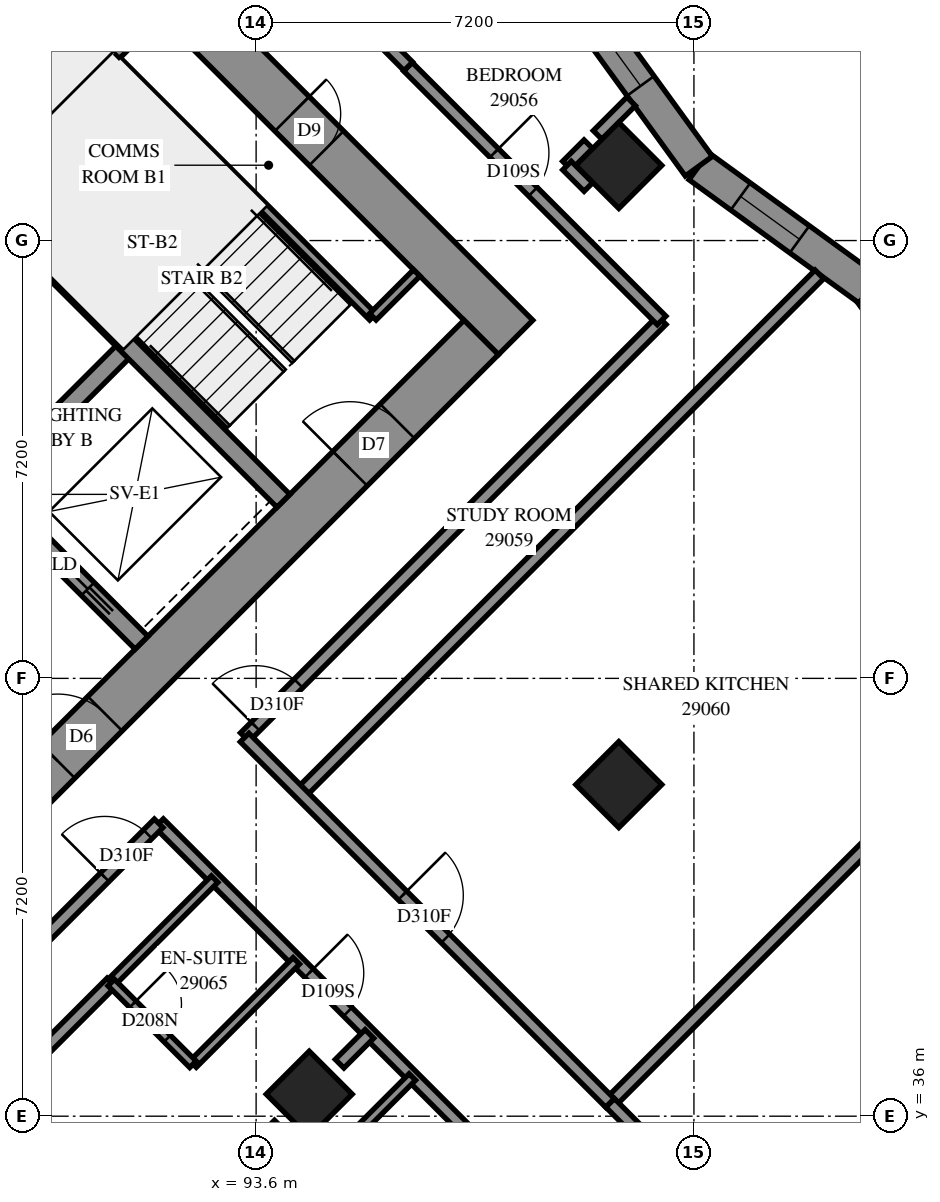
"""IFC4 building model, lengths in metres.
Left out: names, types, materials, properties, quantities, classifications, styles, units other than length and angle.
Written with IfcOpenShell. Run it as: python <this file> out.ifc"""

import sys

from ifc_helpers import new_model, si_unit, direction, frame, frame_2d, origin, origin_2d, place, context, subcontext, project, spatial, polyline, rectangle, outline, extrude, element, fill, save


model = new_model("IFC4")
c1 = context("Model", 3, precision=1e-05, world=origin(), true_north=direction((0.0, 1.0)))
c2 = subcontext(c1, "Body", "Model", "MODEL_VIEW")
j1 = project(units=[si_unit("LENGTHUNIT", "METRE"), si_unit("PLANEANGLEUNIT", "RADIAN")], contexts=[c1])
p1 = place(None, origin())
s1 = spatial("IfcSite", under=j1, at=p1, CompositionType="ELEMENT")
p2 = place(p1, origin())
s2 = spatial("IfcBuilding", under=s1, at=p2, CompositionType="ELEMENT")
p3 = place(p2, frame((0.0, 0.0, 108.4)))
s3 = spatial("IfcBuildingStorey", under=s2, at=p3, CompositionType="ELEMENT", Elevation=108.4)
for number, where, z_axis, x_axis in (
    (1, (99.565, 51.635, 0.0), (0.0, 0.0, 1.0), (0.707, -0.707, 0.0)),
    (2, (99.565, 41.453, 0.0), (0.0, 0.0, 1.0), (0.707, -0.707, 0.0)),
    (3, (94.474, 36.362, 0.0), (0.0, 0.0, 1.0), (0.707, -0.707, 0.0)),
):
    element("IfcColumn", number, at=place(p3, frame(where, z_axis=z_axis, x_axis=x_axis)), inside=s3, PredefinedType="COLUMN", context=c2, shape_type="SweptSolid", body=[
        extrude(rectangle(XDim=1.0, YDim=1.0, at=origin_2d()), origin(), (0.0, 0.0, 1.0), 3.1),
    ])
p4 = place(p3, frame((86.554, 60.121, -0.3), z_axis=(0.0, 0.0, 1.0), x_axis=(0.7071067812, -0.7071067812, 0.0)))
e4 = element("IfcWall", 4, at=p4, inside=s3, PredefinedType="SHEAR", context=c2, shape_type="SweptSolid", body=[
    extrude(rectangle(XDim=16.0, YDim=0.8, at=frame_2d((8.0, 0.0))), origin(), (0.0, 0.0, 1.0), 2.7),
])
p5 = place(p4, frame((10.8, 0.0, 0.3)))
e5 = element("IfcOpeningElement", 5, at=p5, cuts=e4, PredefinedType="OPENING", context=c2, shape_type="SweptSolid", body=[
    extrude(rectangle(XDim=0.8, YDim=2.1, at=frame_2d((0.4, 1.05))), frame((0.0, 0.41, 0.0), z_axis=(0.0, -1.0, 0.0), x_axis=(1.0, 0.0, 0.0)), (0.0, 0.0, 1.0), 0.82),
])
p6 = place(p3, frame((87.12, 38.625, -0.3), z_axis=(0.0, 0.0, 1.0), x_axis=(0.7071067812, 0.7071067812, 0.0)))
e6 = element("IfcWall", 6, at=p6, inside=s3, PredefinedType="SHEAR", context=c2, shape_type="SweptSolid", body=[
    extrude(rectangle(XDim=14.4, YDim=0.8, at=frame_2d((7.2, 0.0))), origin(), (0.0, 0.0, 1.0), 2.7),
])
p7 = place(p6, frame((4.55, 0.0, 0.3)))
e7 = element("IfcOpeningElement", 7, at=p7, cuts=e6, PredefinedType="OPENING", context=c2, shape_type="SweptSolid", body=[
    extrude(rectangle(XDim=1.1, YDim=2.1, at=frame_2d((0.55, 1.05))), frame((0.0, 0.41, 0.0), z_axis=(0.0, -1.0, 0.0), x_axis=(1.0, 0.0, 0.0)), (0.0, 0.0, 1.0), 0.82),
])
p8 = place(p6, frame((11.35, 0.0, 0.3)))
e8 = element("IfcOpeningElement", 8, at=p8, cuts=e6, PredefinedType="OPENING", context=c2, shape_type="SweptSolid", body=[
    extrude(rectangle(XDim=1.1, YDim=2.1, at=frame_2d((0.55, 1.05))), frame((0.0, 0.41, 0.0), z_axis=(0.0, -1.0, 0.0), x_axis=(1.0, 0.0, 0.0)), (0.0, 0.0, 1.0), 0.82),
])
p9 = place(p3, frame((89.17, 46.332, 0.0), z_axis=(0.0, 0.0, 1.0), x_axis=(0.7071067812, 0.7071067812, 0.0)))
e9 = element("IfcWall", 9, at=p9, inside=s3, PredefinedType="SOLIDWALL", context=c2, shape_type="SweptSolid", body=[
    extrude(rectangle(XDim=3.3, YDim=0.3, at=frame_2d((1.65, 0.0))), origin(), (0.0, 0.0, 1.0), 3.1),
])
p10 = place(p3, frame((81.534, 53.969, 0.0), z_axis=(0.0, 0.0, 1.0), x_axis=(0.707103309, -0.7071102534, 0.0)))
e10 = element("IfcWall", 10, at=p10, inside=s3, PredefinedType="SOLIDWALL", context=c2, shape_type="SweptSolid", body=[
    extrude(rectangle(XDim=14.4, YDim=0.3, at=frame_2d((7.2, 0.0))), origin(), (0.0, 0.0, 1.0), 3.1),
])
p11 = place(p10, frame((12.05, 0.0, 0.0)))
e11 = element("IfcOpeningElement", 11, at=p11, cuts=e10, PredefinedType="OPENING", context=c2, shape_type="SweptSolid", body=[
    extrude(rectangle(XDim=1.1, YDim=2.1, at=frame_2d((0.55, 1.05))), frame((0.0, 0.16, 0.0), z_axis=(0.0, -1.0, 0.0), x_axis=(1.0, 0.0, 0.0)), (0.0, 0.0, 1.0), 0.32),
])
p12 = place(p3, frame((88.958, 51.211, 0.0), z_axis=(0.0, 0.0, 1.0), x_axis=(0.7070998367, -0.7071137256, 0.0)))
e12 = element("IfcWall", 12, at=p12, inside=s3, PredefinedType="SOLIDWALL", context=c2, shape_type="SweptSolid", body=[
    extrude(rectangle(XDim=7.2, YDim=0.3, at=frame_2d((3.6, 0.0))), origin(), (0.0, 0.0, 1.0), 3.1),
])
p13 = place(p3, frame((88.958, 51.211, 0.0), z_axis=(0.0, 0.0, 1.0), x_axis=(0.7071067812, 0.7071067812, 0.0)))
e13 = element("IfcWall", 13, at=p13, inside=s3, PredefinedType="SOLIDWALL", context=c2, shape_type="SweptSolid", body=[
    extrude(rectangle(XDim=4.2, YDim=0.3, at=frame_2d((2.1, 0.0))), origin(), (0.0, 0.0, 1.0), 3.1),
])
p14 = place(p3, frame((105.706, 46.797, 0.0), z_axis=(0.0, 0.0, 1.0), x_axis=(-0.5874228075, 0.8092802019, 0.0)))
e14 = element("IfcWall", 14, at=p14, inside=s3, PredefinedType="SOLIDWALL", context=c2, shape_type="SweptSolid", body=[
    extrude(outline(polyline([(0.044, -0.275), (3.499, -0.275), (3.411, 0.275), (-0.044, 0.275), (0.044, -0.275)])), origin(), (0.0, 0.0, 1.0), 3.1),
])
p15 = place(p14, frame((1.291, 0.0, 0.5)))
e15 = element("IfcOpeningElement", 15, at=p15, cuts=e14, PredefinedType="OPENING", context=c2, shape_type="SweptSolid", body=[
    extrude(rectangle(XDim=1.2, YDim=2.45, at=frame_2d((0.6, 1.225))), frame((0.0, 0.285, 0.0), z_axis=(0.0, -1.0, 0.0), x_axis=(1.0, 0.0, 0.0)), (0.0, 0.0, 1.0), 0.57),
])
p16 = place(p3, frame((103.677, 49.593, 0.0), z_axis=(0.0, 0.0, 1.0), x_axis=(-0.8092802019, 0.5874228075, 0.0)))
e16 = element("IfcWall", 16, at=p16, inside=s3, PredefinedType="SOLIDWALL", context=c2, shape_type="SweptSolid", body=[
    extrude(outline(polyline([(-0.044, -0.275), (3.411, -0.275), (3.499, 0.275), (0.044, 0.275), (-0.044, -0.275)])), origin(), (0.0, 0.0, 1.0), 3.1),
])
p17 = place(p16, frame((1.408, 0.0, 0.5)))
e17 = element("IfcOpeningElement", 17, at=p17, cuts=e16, PredefinedType="OPENING", context=c2, shape_type="SweptSolid", body=[
    extrude(rectangle(XDim=1.2, YDim=2.45, at=frame_2d((0.6, 1.225))), frame((0.0, 0.285, 0.0), z_axis=(0.0, -1.0, 0.0), x_axis=(1.0, 0.0, 0.0)), (0.0, 0.0, 1.0), 0.57),
])
p18 = place(p3, frame((100.88, 51.623, 0.0), z_axis=(0.0, 0.0, 1.0), x_axis=(-0.5874228075, 0.8092802019, 0.0)))
e18 = element("IfcWall", 18, at=p18, inside=s3, PredefinedType="SOLIDWALL", context=c2, shape_type="SweptSolid", body=[
    extrude(outline(polyline([(0.044, -0.275), (3.499, -0.275), (3.411, 0.275), (-0.044, 0.275), (0.044, -0.275)])), origin(), (0.0, 0.0, 1.0), 3.1),
])
p19 = place(p18, frame((1.631, 0.0, 0.5)))
e19 = element("IfcOpeningElement", 19, at=p19, cuts=e18, PredefinedType="OPENING", context=c2, shape_type="SweptSolid", body=[
    extrude(rectangle(XDim=1.2, YDim=2.45, at=frame_2d((0.6, 1.225))), frame((0.0, 0.285, 0.0), z_axis=(0.0, -1.0, 0.0), x_axis=(1.0, 0.0, 0.0)), (0.0, 0.0, 1.0), 0.57),
])
p20 = place(p3, frame((91.313, 53.354, 0.0), z_axis=(0.0, 0.0, 1.0), x_axis=(0.7071067812, -0.7071067812, 0.0)))
e20 = element("IfcWall", 20, at=p20, inside=s3, PredefinedType="PARTITIONING", context=c2, shape_type="SweptSolid", body=[
    extrude(rectangle(XDim=5.95, YDim=0.15, at=frame_2d((2.975, 0.0))), origin(), (0.0, 0.0, 1.0), 3.1),
])
p21 = place(p3, frame((95.52, 49.146, 0.0), z_axis=(0.0, 0.0, 1.0), x_axis=(0.7071067812, 0.7071067812, 0.0)))
e21 = element("IfcWall", 21, at=p21, inside=s3, PredefinedType="PARTITIONING", context=c2, shape_type="SweptSolid", body=[
    extrude(rectangle(XDim=1.02, YDim=0.15, at=frame_2d((0.51, 0.0))), origin(), (0.0, 0.0, 1.0), 3.1),
])
p22 = place(p3, frame((92.004, 40.819, 0.0), z_axis=(0.0, 0.0, 1.0), x_axis=(0.7071067812, -0.7071067812, 0.0)))
e22 = element("IfcWall", 22, at=p22, inside=s3, PredefinedType="PARTITIONING", context=c2, shape_type="SweptSolid", body=[
    extrude(rectangle(XDim=19.298, YDim=0.2, at=frame_2d((9.649, 0.0))), origin(), (0.0, 0.0, 1.0), 3.1),
])
p23 = place(p22, frame((3.489, 0.0, 0.0)))
e23 = element("IfcOpeningElement", 23, at=p23, cuts=e22, PredefinedType="OPENING", context=c2, shape_type="SweptSolid", body=[
    extrude(rectangle(XDim=0.9, YDim=2.1, at=frame_2d((0.45, 1.05))), frame((0.0, 0.11, 0.0), z_axis=(0.0, -1.0, 0.0), x_axis=(1.0, 0.0, 0.0)), (0.0, 0.0, 1.0), 0.22),
])
p24 = place(p22, frame((9.319, 0.0, 0.0)))
e24 = element("IfcOpeningElement", 24, at=p24, cuts=e22, PredefinedType="OPENING", context=c2, shape_type="SweptSolid", body=[
    extrude(rectangle(XDim=0.9, YDim=2.1, at=frame_2d((0.45, 1.05))), frame((0.0, 0.11, 0.0), z_axis=(0.0, -1.0, 0.0), x_axis=(1.0, 0.0, 0.0)), (0.0, 0.0, 1.0), 0.22),
])
p25 = place(p22, frame((15.961, 0.0, 0.0)))
e25 = element("IfcOpeningElement", 25, at=p25, cuts=e22, PredefinedType="OPENING", context=c2, shape_type="SweptSolid", body=[
    extrude(rectangle(XDim=0.9, YDim=2.1, at=frame_2d((0.45, 1.05))), frame((0.0, 0.11, 0.0), z_axis=(0.0, -1.0, 0.0), x_axis=(1.0, 0.0, 0.0)), (0.0, 0.0, 1.0), 0.22),
])
p26 = place(p3, frame((99.423, 36.221, 0.0), z_axis=(0.0, 0.0, 1.0), x_axis=(0.7071067812, 0.7071067812, 0.0)))
e26 = element("IfcWall", 26, at=p26, inside=s3, PredefinedType="PARTITIONING", context=c2, shape_type="SweptSolid", body=[
    extrude(rectangle(XDim=12.125, YDim=0.2, at=frame_2d((6.062, 0.0))), origin(), (0.0, 0.0, 1.0), 3.1),
])
p27 = place(p3, frame((94.331, 41.313, 0.0), z_axis=(0.0, 0.0, 1.0), x_axis=(0.7071109253, 0.7071026371, 0.0)))
e27 = element("IfcWall", 27, at=p27, inside=s3, PredefinedType="PARTITIONING", context=c2, shape_type="SweptSolid", body=[
    extrude(rectangle(XDim=12.065, YDim=0.2, at=frame_2d((6.033, 0.0))), origin(), (0.0, 0.0, 1.0), 3.1),
])
p28 = place(p3, frame((93.413, 42.233, 0.0), z_axis=(0.0, 0.0, 1.0), x_axis=(0.7071067812, 0.7071067812, 0.0)))
e28 = element("IfcWall", 28, at=p28, inside=s3, PredefinedType="PARTITIONING", context=c2, shape_type="SweptSolid", body=[
    extrude(rectangle(XDim=9.699, YDim=0.2, at=frame_2d((4.849, 0.0))), origin(), (0.0, 0.0, 1.0), 3.1),
])
p29 = place(p28, frame((0.249, 0.0, 0.0)))
e29 = element("IfcOpeningElement", 29, at=p29, cuts=e28, PredefinedType="OPENING", context=c2, shape_type="SweptSolid", body=[
    extrude(rectangle(XDim=1.0, YDim=2.1, at=frame_2d((0.5, 1.05))), frame((0.0, 0.11, 0.0), z_axis=(0.0, -1.0, 0.0), x_axis=(1.0, 0.0, 0.0)), (0.0, 0.0, 1.0), 0.22),
])
p30 = place(p3, frame((93.411, 42.227, 0.0), z_axis=(0.0, 0.0, 1.0), x_axis=(0.7071067812, -0.7071067812, 0.0)))
e30 = element("IfcWall", 30, at=p30, inside=s3, PredefinedType="PARTITIONING", context=c2, shape_type="SweptSolid", body=[
    extrude(rectangle(XDim=8.499, YDim=0.2, at=frame_2d((4.25, 0.0))), origin(), (0.0, 0.0, 1.0), 3.1),
])
p31 = place(p30, frame((3.672, 0.0, 0.0)))
e31 = element("IfcOpeningElement", 31, at=p31, cuts=e30, PredefinedType="OPENING", context=c2, shape_type="SweptSolid", body=[
    extrude(rectangle(XDim=1.0, YDim=2.1, at=frame_2d((0.5, 1.05))), frame((0.0, 0.11, 0.0), z_axis=(0.0, -1.0, 0.0), x_axis=(1.0, 0.0, 0.0)), (0.0, 0.0, 1.0), 0.22),
])
p32 = place(p3, frame((86.835, 35.655, 0.0), z_axis=(0.0, 0.0, 1.0), x_axis=(0.7071067812, 0.7071067812, 0.0)))
e32 = element("IfcWall", 32, at=p32, inside=s3, PredefinedType="PARTITIONING", context=c2, shape_type="SweptSolid", body=[
    extrude(rectangle(XDim=7.3, YDim=0.2, at=frame_2d((3.65, 0.0))), origin(), (0.0, 0.0, 1.0), 3.1),
])
p33 = place(p32, frame((6.046, 0.0, 0.0)))
e33 = element("IfcOpeningElement", 33, at=p33, cuts=e32, PredefinedType="OPENING", context=c2, shape_type="SweptSolid", body=[
    extrude(rectangle(XDim=1.0, YDim=2.1, at=frame_2d((0.5, 1.05))), frame((0.0, 0.11, 0.0), z_axis=(0.0, -1.0, 0.0), x_axis=(1.0, 0.0, 0.0)), (0.0, 0.0, 1.0), 0.22),
])
p34 = place(p3, frame((86.334, 33.312, 0.0), z_axis=(0.0, 0.0, 1.0), x_axis=(0.7069693124, 0.7072442232, 0.0)))
e34 = element("IfcWall", 34, at=p34, inside=s3, PredefinedType="PARTITIONING", context=c2, shape_type="SweptSolid", body=[
    extrude(rectangle(XDim=6.911, YDim=0.2, at=frame_2d((3.456, 0.0))), origin(), (0.0, 0.0, 1.0), 3.1),
])
p35 = place(p3, frame((96.097, 53.258, 0.0), z_axis=(0.0, 0.0, 1.0), x_axis=(0.7071067812, -0.7071067812, 0.0)))
e35 = element("IfcWall", 35, at=p35, inside=s3, PredefinedType="PARTITIONING", context=c2, shape_type="SweptSolid", body=[
    extrude(rectangle(XDim=5.9, YDim=0.2, at=frame_2d((2.95, 0.0))), origin(), (0.0, 0.0, 1.0), 3.1),
])
p36 = place(p35, frame((2.006, 0.0, 0.0)))
e36 = element("IfcOpeningElement", 36, at=p36, cuts=e35, PredefinedType="OPENING", context=c2, shape_type="SweptSolid", body=[
    extrude(rectangle(XDim=0.9, YDim=2.1, at=frame_2d((0.45, 1.05))), frame((0.0, 0.11, 0.0), z_axis=(0.0, -1.0, 0.0), x_axis=(1.0, 0.0, 0.0)), (0.0, 0.0, 1.0), 0.22),
])
p37 = place(p3, frame((89.881, 31.771, 0.0), z_axis=(0.0, 0.0, 1.0), x_axis=(0.7071067812, 0.7071067812, 0.0)))
e37 = element("IfcWall", 37, at=p37, inside=s3, PredefinedType="PARTITIONING", context=c2, shape_type="SweptSolid", body=[
    extrude(rectangle(XDim=5.787, YDim=0.2, at=frame_2d((2.893, 0.0))), origin(), (0.0, 0.0, 1.0), 3.1),
])
p38 = place(p3, frame((103.168, 32.47, 0.0), z_axis=(0.0, 0.0, 1.0), x_axis=(-0.7067858967, 0.7074275201, 0.0)))
e38 = element("IfcWall", 38, at=p38, inside=s3, PredefinedType="PARTITIONING", context=c2, shape_type="SweptSolid", body=[
    extrude(rectangle(XDim=5.299, YDim=0.2, at=frame_2d((2.65, 0.0))), origin(), (0.0, 0.0, 1.0), 3.1),
])
p39 = place(p38, frame((2.043, 0.0, 0.0)))
e39 = element("IfcOpeningElement", 39, at=p39, cuts=e38, PredefinedType="OPENING", context=c2, shape_type="SweptSolid", body=[
    extrude(rectangle(XDim=0.9, YDim=2.1, at=frame_2d((0.45, 1.05))), frame((0.0, 0.11, 0.0), z_axis=(0.0, -1.0, 0.0), x_axis=(1.0, 0.0, 0.0)), (0.0, 0.0, 1.0), 0.22),
])
for number, where, z_axis, x_axis in (
    (40, (92.563, 36.857, 0.0), (0.0, 0.0, 1.0), (0.707, 0.707, 0.0)),
    (41, (91.219, 38.201, 0.0), (0.0, 0.0, 1.0), (0.707, 0.707, 0.0)),
):
    element("IfcWall", number, at=place(p3, frame(where, z_axis=z_axis, x_axis=x_axis)), inside=s3, PredefinedType="PARTITIONING", context=c2, shape_type="SweptSolid", body=[
        extrude(rectangle(XDim=2.401, YDim=0.15, at=frame_2d((1.201, 0.0))), origin(), (0.0, 0.0, 1.0), 3.1),
    ])
p40 = place(p3, frame((94.473, 34.949, 0.0), z_axis=(0.0, 0.0, 1.0), x_axis=(0.7071067812, 0.7071067812, 0.0)))
e42 = element("IfcWall", 42, at=p40, inside=s3, PredefinedType="PARTITIONING", context=c2, shape_type="SweptSolid", body=[
    extrude(rectangle(XDim=2.398, YDim=0.15, at=frame_2d((1.199, 0.0))), origin(), (0.0, 0.0, 1.0), 3.1),
])
p41 = place(p3, frame((91.217, 38.197, 0.0), z_axis=(0.0, 0.0, 1.0), x_axis=(0.7071067812, -0.7071067812, 0.0)))
e43 = element("IfcWall", 43, at=p41, inside=s3, PredefinedType="PARTITIONING", context=c2, shape_type="SweptSolid", body=[
    extrude(rectangle(XDim=1.901, YDim=0.15, at=frame_2d((0.95, 0.0))), origin(), (0.0, 0.0, 1.0), 3.1),
])
p42 = place(p41, frame((0.502, 0.0, 0.0)))
e44 = element("IfcOpeningElement", 44, at=p42, cuts=e43, PredefinedType="OPENING", context=c2, shape_type="SweptSolid", body=[
    extrude(rectangle(XDim=0.8, YDim=2.1, at=frame_2d((0.4, 1.05))), frame((0.0, 0.085, 0.0), z_axis=(0.0, -1.0, 0.0), x_axis=(1.0, 0.0, 0.0)), (0.0, 0.0, 1.0), 0.17),
])
p43 = place(p3, frame((99.216, 52.136, 0.0), z_axis=(0.0, 0.0, 1.0), x_axis=(0.7070426997, 0.7071708568, 0.0)))
e45 = element("IfcWall", 45, at=p43, inside=s3, PredefinedType="PARTITIONING", context=c2, shape_type="SweptSolid", body=[
    extrude(rectangle(XDim=0.78, YDim=0.2, at=frame_2d((0.39, 0.0))), origin(), (0.0, 0.0, 1.0), 3.1),
])
p44 = place(p3, frame((95.609, 53.761, 0.0), z_axis=(0.0, 0.0, 1.0), x_axis=(0.7056768426, -0.7085338339, 0.0)))
e46 = element("IfcWall", 46, at=p44, inside=s3, PredefinedType="PARTITIONING", context=c2, shape_type="SweptSolid", body=[
    extrude(rectangle(XDim=0.7, YDim=0.2, at=frame_2d((0.35, 0.0))), origin(), (0.0, 0.0, 1.0), 3.1),
])
p45 = place(p3, frame((94.973, 36.863, 0.0), z_axis=(0.0, 0.0, 1.0), x_axis=(0.7071067812, 0.7071067812, 0.0)))
e47 = element("IfcWall", 47, at=p45, inside=s3, PredefinedType="PARTITIONING", context=c2, shape_type="SweptSolid", body=[
    extrude(rectangle(XDim=0.693, YDim=0.2, at=frame_2d((0.346, 0.0))), origin(), (0.0, 0.0, 1.0), 3.1),
])
for number, where, z_axis, x_axis in (
    (48, (98.712, 51.632, 0.0), (0.0, 0.0, 1.0), (0.707, 0.707, 0.0)),
    (49, (98.713, 51.633, 0.0), (0.0, 0.0, 1.0), (0.707, -0.707, 0.0)),
):
    element("IfcWall", number, at=place(p3, frame(where, z_axis=z_axis, x_axis=x_axis)), inside=s3, PredefinedType="PARTITIONING", context=c2, shape_type="SweptSolid", body=[
        extrude(rectangle(XDim=0.498, YDim=0.2, at=frame_2d((0.249, 0.0))), origin(), (0.0, 0.0, 1.0), 3.1),
    ])
p46 = place(p17, origin())
e50 = element("IfcWindow", 50, at=p46, inside=s3, PartitioningType="SINGLE_PANEL", PredefinedType="WINDOW", context=c2, shape_type="SweptSolid", body=[
    extrude(rectangle(XDim=1.2, YDim=2.45, at=frame_2d((0.6, 1.225))), frame((0.0, 0.155, 0.0), z_axis=(0.0, -1.0, 0.0), x_axis=(1.0, 0.0, 0.0)), (0.0, 0.0, 1.0), 0.06),
])
fill(e17, e50)
p47 = place(p19, origin())
e51 = element("IfcWindow", 51, at=p47, inside=s3, PartitioningType="SINGLE_PANEL", PredefinedType="WINDOW", context=c2, shape_type="SweptSolid", body=[
    extrude(rectangle(XDim=1.2, YDim=2.45, at=frame_2d((0.6, 1.225))), frame((0.0, 0.155, 0.0), z_axis=(0.0, -1.0, 0.0), x_axis=(1.0, 0.0, 0.0)), (0.0, 0.0, 1.0), 0.06),
])
fill(e19, e51)
p48 = place(p5, origin())
e52 = element("IfcDoor", 52, at=p48, inside=s3, OperationType="SINGLE_SWING_RIGHT", PredefinedType="DOOR", context=c2, shape_type="SweptSolid", body=[
    extrude(rectangle(XDim=0.8, YDim=2.1, at=frame_2d((0.4, 1.05))), frame((0.0, -0.34, 0.0), z_axis=(0.0, -1.0, 0.0), x_axis=(1.0, 0.0, 0.0)), (0.0, 0.0, 1.0), 0.05),
])
fill(e5, e52)
p49 = place(p7, origin())
e53 = element("IfcDoor", 53, at=p49, inside=s3, OperationType="DOUBLE_DOOR_SINGLE_SWING", PredefinedType="DOOR", context=c2, shape_type="SweptSolid", body=[
    extrude(rectangle(XDim=1.1, YDim=2.1, at=frame_2d((0.55, 1.05))), frame((0.0, 0.025, 0.0), z_axis=(0.0, -1.0, 0.0), x_axis=(1.0, 0.0, 0.0)), (0.0, 0.0, 1.0), 0.05),
])
fill(e7, e53)
p50 = place(p8, origin())
e54 = element("IfcDoor", 54, at=p50, inside=s3, OperationType="SINGLE_SWING_RIGHT", PredefinedType="DOOR", context=c2, shape_type="SweptSolid", body=[
    extrude(rectangle(XDim=1.1, YDim=2.1, at=frame_2d((0.55, 1.05))), frame((0.0, 0.025, 0.0), z_axis=(0.0, -1.0, 0.0), x_axis=(1.0, 0.0, 0.0)), (0.0, 0.0, 1.0), 0.05),
])
fill(e8, e54)
p51 = place(p11, origin())
e55 = element("IfcDoor", 55, at=p51, inside=s3, OperationType="SLIDING_TO_RIGHT", PredefinedType="DOOR", context=c2, shape_type="SweptSolid", body=[
    extrude(rectangle(XDim=1.1, YDim=2.1, at=frame_2d((0.55, 1.05))), frame((0.0, 0.025, 0.0), z_axis=(0.0, -1.0, 0.0), x_axis=(1.0, 0.0, 0.0)), (0.0, 0.0, 1.0), 0.05),
])
fill(e11, e55)
p52 = place(p36, origin())
e56 = element("IfcDoor", 56, at=p52, inside=s3, OperationType="SINGLE_SWING_LEFT", PredefinedType="DOOR", context=c2, shape_type="SweptSolid", body=[
    extrude(rectangle(XDim=0.9, YDim=2.1, at=frame_2d((0.45, 1.05))), frame((0.0, 0.025, 0.0), z_axis=(0.0, -1.0, 0.0), x_axis=(1.0, 0.0, 0.0)), (0.0, 0.0, 1.0), 0.05),
])
fill(e36, e56)
p53 = place(p29, origin())
e57 = element("IfcDoor", 57, at=p53, inside=s3, OperationType="SINGLE_SWING_LEFT", PredefinedType="DOOR", context=c2, shape_type="SweptSolid", body=[
    extrude(rectangle(XDim=1.0, YDim=2.1, at=frame_2d((0.5, 1.05))), frame((0.0, 0.025, 0.0), z_axis=(0.0, -1.0, 0.0), x_axis=(1.0, 0.0, 0.0)), (0.0, 0.0, 1.0), 0.05),
])
fill(e29, e57)
p54 = place(p31, origin())
e58 = element("IfcDoor", 58, at=p54, inside=s3, OperationType="SINGLE_SWING_RIGHT", PredefinedType="DOOR", context=c2, shape_type="SweptSolid", body=[
    extrude(rectangle(XDim=1.0, YDim=2.1, at=frame_2d((0.5, 1.05))), frame((0.0, 0.025, 0.0), z_axis=(0.0, -1.0, 0.0), x_axis=(1.0, 0.0, 0.0)), (0.0, 0.0, 1.0), 0.05),
])
fill(e31, e58)
p55 = place(p33, origin())
e59 = element("IfcDoor", 59, at=p55, inside=s3, OperationType="SINGLE_SWING_RIGHT", PredefinedType="DOOR", context=c2, shape_type="SweptSolid", body=[
    extrude(rectangle(XDim=1.0, YDim=2.1, at=frame_2d((0.5, 1.05))), frame((0.0, 0.025, 0.0), z_axis=(0.0, -1.0, 0.0), x_axis=(1.0, 0.0, 0.0)), (0.0, 0.0, 1.0), 0.05),
])
fill(e33, e59)
p56 = place(p23, origin())
e60 = element("IfcDoor", 60, at=p56, inside=s3, OperationType="SINGLE_SWING_LEFT", PredefinedType="DOOR", context=c2, shape_type="SweptSolid", body=[
    extrude(rectangle(XDim=0.9, YDim=2.1, at=frame_2d((0.45, 1.05))), frame((0.0, 0.025, 0.0), z_axis=(0.0, -1.0, 0.0), x_axis=(1.0, 0.0, 0.0)), (0.0, 0.0, 1.0), 0.05),
])
fill(e23, e60)
p57 = place(p42, origin())
e61 = element("IfcDoor", 61, at=p57, inside=s3, OperationType="SINGLE_SWING_RIGHT", PredefinedType="DOOR", context=c2, shape_type="SweptSolid", body=[
    extrude(rectangle(XDim=0.8, YDim=2.1, at=frame_2d((0.4, 1.05))), frame((0.0, 0.025, 0.0), z_axis=(0.0, -1.0, 0.0), x_axis=(1.0, 0.0, 0.0)), (0.0, 0.0, 1.0), 0.05),
])
fill(e44, e61)
save(model, sys.argv[1])
